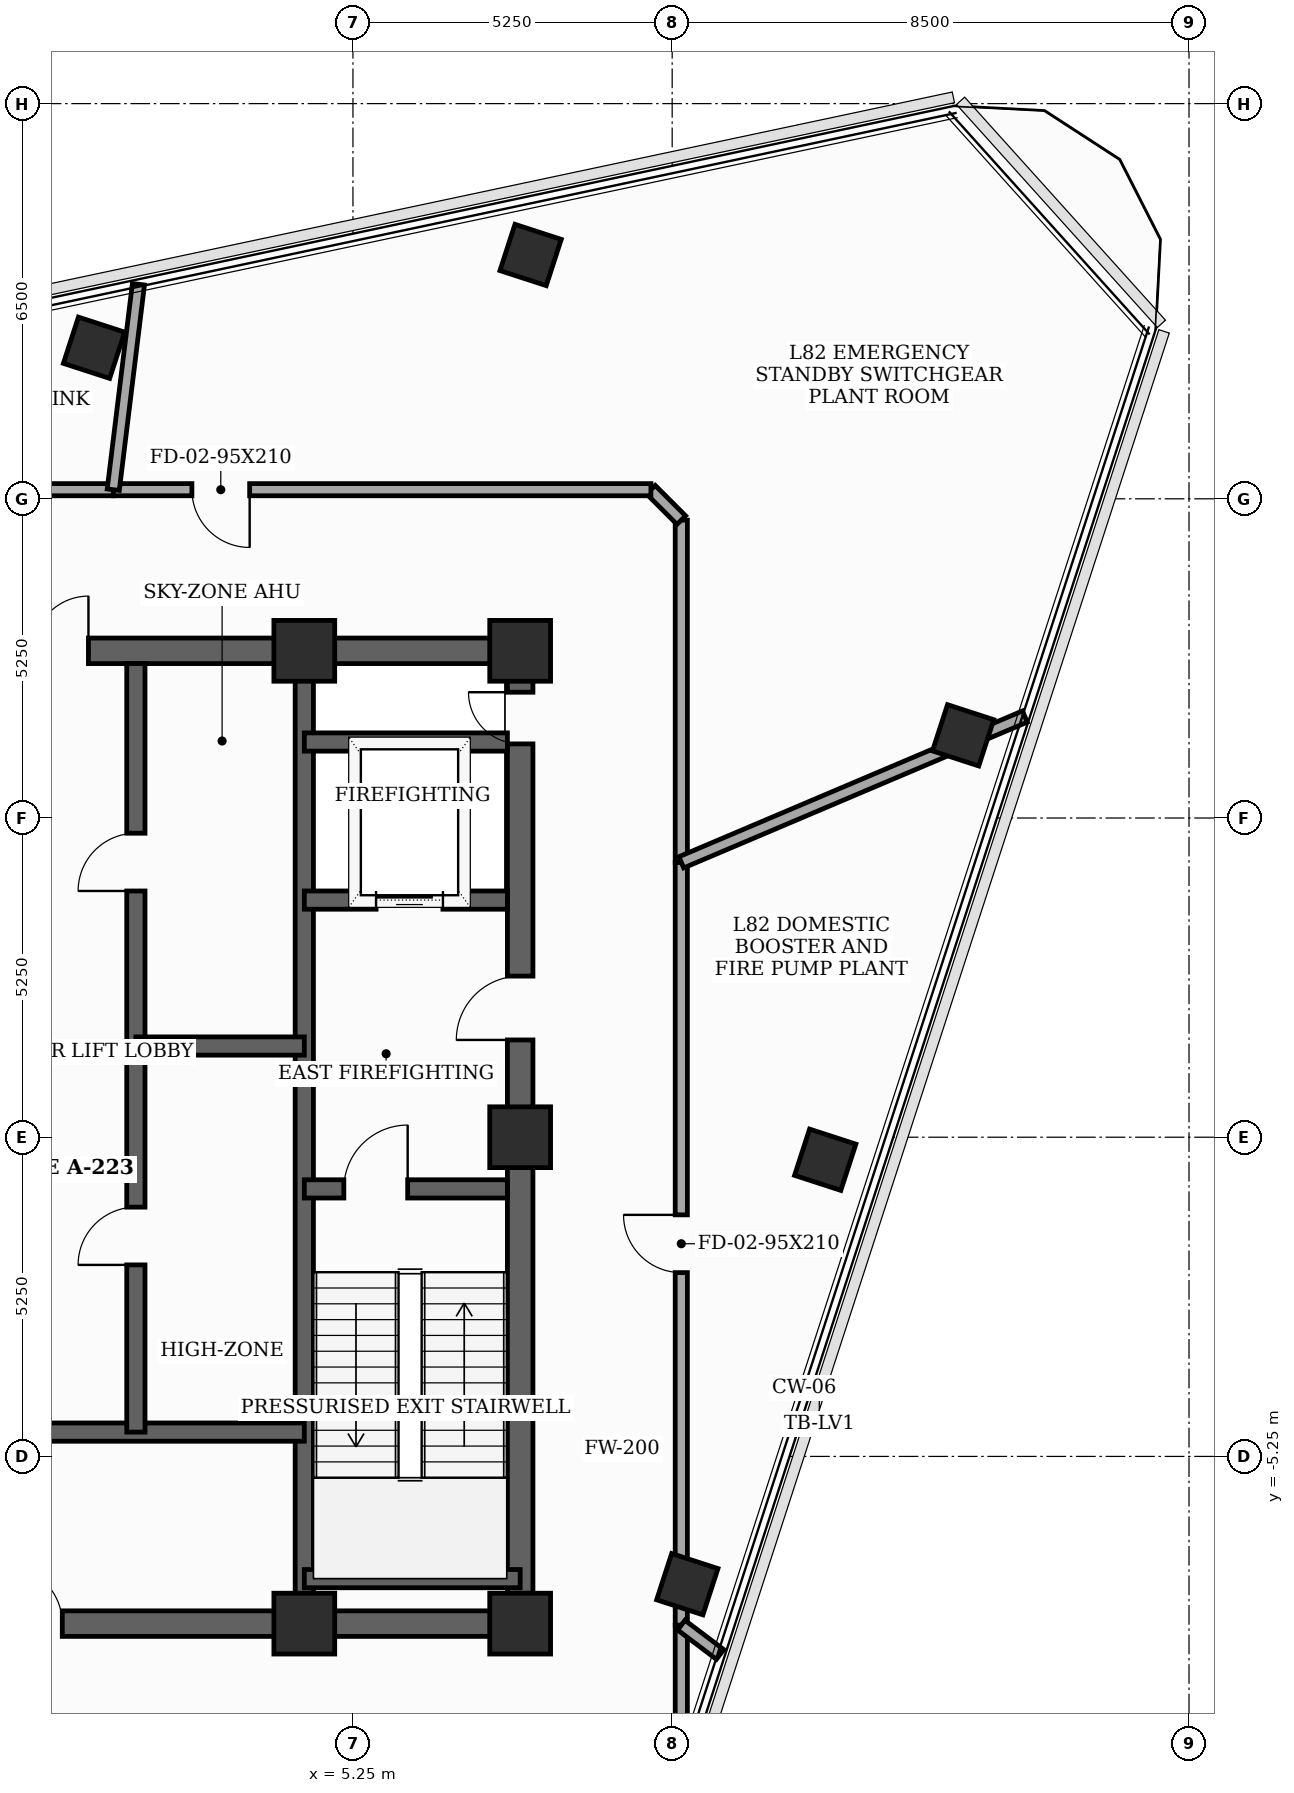
"""IFC4 building model, lengths in metres.
Left out: names, types, materials, properties, quantities, classifications, styles, units other than length and angle.
Written with IfcOpenShell. Run it as: python <this file> out.ifc"""

import sys

from ifc_helpers import new_model, si_unit, direction, frame, frame_2d, origin, origin_2d, place, context, subcontext, project, spatial, rectangle, extrude, element, fill, save


model = new_model("IFC4")
c1 = context("Model", 3, precision=1e-05, world=origin(), true_north=direction((0.0, 1.0)))
c2 = subcontext(c1, "Body", "Model", "MODEL_VIEW")
j1 = project(units=[si_unit("LENGTHUNIT", "METRE"), si_unit("PLANEANGLEUNIT", "RADIAN")], contexts=[c1])
p1 = place(None, origin())
s1 = spatial("IfcSite", under=j1, at=p1, CompositionType="ELEMENT")
p2 = place(p1, origin())
s2 = spatial("IfcBuilding", under=s1, at=p2, CompositionType="ELEMENT")
p3 = place(p2, frame((0.0, 0.0, 317.4)))
s3 = spatial("IfcBuildingStorey", under=s2, at=p3, CompositionType="ELEMENT", Elevation=317.4)
for number, where, z_axis, x_axis in (
    (1, (4.45, -8.0, 0.0), (0.0, 0.0, 1.0), (1.0, 0.0, 0.0)),
    (2, (8.0, -8.0, 0.0), (0.0, 0.0, 1.0), (1.0, 0.0, 0.0)),
    (3, (8.0, 0.0, 0.0), (0.0, 0.0, 1.0), (1.0, 0.0, 0.0)),
    (4, (8.0, 8.0, 0.0), (0.0, 0.0, 1.0), (1.0, 0.0, 0.0)),
    (5, (4.45, 8.0, 0.0), (0.0, 0.0, 1.0), (1.0, 0.0, 0.0)),
):
    element("IfcColumn", number, at=place(p3, frame(where, z_axis=z_axis, x_axis=x_axis)), inside=s3, PredefinedType="COLUMN", context=c2, shape_type="SweptSolid", body=[
        extrude(rectangle(XDim=1.0, YDim=1.0, at=origin_2d()), origin(), (0.0, 0.0, 1.0), 4.6),
    ])
for number, where, z_axis, x_axis in (
    (6, (10.749, -7.351, 0.0), (0.0, 0.0, 1.0), (0.309, 0.951, 0.0)),
    (7, (13.017, -0.371, 0.0), (0.0, 0.0, 1.0), (0.309, 0.951, 0.0)),
    (8, (15.285, 6.61, 0.0), (0.0, 0.0, 1.0), (0.309, 0.951, 0.0)),
    (9, (8.172, 14.51, 0.0), (0.0, 0.0, 1.0), (0.309, 0.951, 0.0)),
    (10, (0.992, 12.984, 0.0), (0.0, 0.0, 1.0), (0.309, 0.951, 0.0)),
):
    element("IfcColumn", number, at=place(p3, frame(where, z_axis=z_axis, x_axis=x_axis)), inside=s3, PredefinedType="COLUMN", context=c2, shape_type="SweptSolid", body=[
        extrude(rectangle(XDim=0.8, YDim=0.8, at=origin_2d()), origin(), (0.0, 0.0, 1.0), 4.6),
    ])
p4 = place(p3, frame((8.0, -8.0, 0.0), z_axis=(0.0, 0.0, 1.0), x_axis=(0.0, 1.0, 0.0)))
e11 = element("IfcWall", 11, at=p4, inside=s3, PredefinedType="SHEAR", context=c2, shape_type="SweptSolid", body=[
    extrude(rectangle(XDim=16.0, YDim=0.42, at=frame_2d((8.0, 0.0))), origin(), (0.0, 0.0, 1.0), 4.38),
])
p5 = place(p4, frame((9.6, 0.0, 0.0)))
e12 = element("IfcOpeningElement", 12, at=p5, cuts=e11, PredefinedType="OPENING", context=c2, shape_type="SweptSolid", body=[
    extrude(rectangle(XDim=1.05, YDim=2.15, at=frame_2d((0.525, 1.075))), frame((0.0, 0.22, 0.0), z_axis=(0.0, -1.0, 0.0), x_axis=(1.0, 0.0, 0.0)), (0.0, 0.0, 1.0), 0.44),
])
p6 = place(p4, frame((14.469, 0.0, 0.0)))
e13 = element("IfcOpeningElement", 13, at=p6, cuts=e11, PredefinedType="OPENING", context=c2, shape_type="SweptSolid", body=[
    extrude(rectangle(XDim=0.85, YDim=2.02, at=frame_2d((0.425, 1.01))), frame((0.0, 0.22, 0.0), z_axis=(0.0, -1.0, 0.0), x_axis=(1.0, 0.0, 0.0)), (0.0, 0.0, 1.0), 0.44),
])
p7 = place(p3, frame((-8.0, -8.0, 0.0), z_axis=(0.0, 0.0, 1.0), x_axis=(1.0, 0.0, 0.0)))
e14 = element("IfcWall", 14, at=p7, inside=s3, PredefinedType="SHEAR", context=c2, shape_type="SweptSolid", body=[
    extrude(rectangle(XDim=16.0, YDim=0.42, at=frame_2d((8.0, 0.0))), origin(), (0.0, 0.0, 1.0), 4.38),
])
p8 = place(p7, frame((7.52, 0.0, 0.0)))
e15 = element("IfcOpeningElement", 15, at=p8, cuts=e14, PredefinedType="OPENING", context=c2, shape_type="SweptSolid", body=[
    extrude(rectangle(XDim=0.95, YDim=2.1, at=frame_2d((0.475, 1.05))), frame((0.0, 0.22, 0.0), z_axis=(0.0, -1.0, 0.0), x_axis=(1.0, 0.0, 0.0)), (0.0, 0.0, 1.0), 0.44),
])
p9 = place(p3, frame((-8.0, 8.0, 0.0), z_axis=(0.0, 0.0, 1.0), x_axis=(1.0, 0.0, 0.0)))
e16 = element("IfcWall", 16, at=p9, inside=s3, PredefinedType="SHEAR", context=c2, shape_type="SweptSolid", body=[
    extrude(rectangle(XDim=16.0, YDim=0.42, at=frame_2d((8.0, 0.0))), origin(), (0.0, 0.0, 1.0), 4.38),
])
p10 = place(p9, frame((7.1, 0.0, 0.0)))
e17 = element("IfcOpeningElement", 17, at=p10, cuts=e16, PredefinedType="OPENING", context=c2, shape_type="SweptSolid", body=[
    extrude(rectangle(XDim=1.8, YDim=2.15, at=frame_2d((0.9, 1.075))), frame((0.0, 0.22, 0.0), z_axis=(0.0, -1.0, 0.0), x_axis=(1.0, 0.0, 0.0)), (0.0, 0.0, 1.0), 0.44),
])
p11 = place(p3, frame((4.45, -7.79, 0.0), z_axis=(0.0, 0.0, 1.0), x_axis=(0.0, 1.0, 0.0)))
e18 = element("IfcWall", 18, at=p11, inside=s3, PredefinedType="SHEAR", context=c2, shape_type="SweptSolid", body=[
    extrude(rectangle(XDim=15.58, YDim=0.3, at=frame_2d((7.79, 0.0))), origin(), (0.0, 0.0, 1.0), 4.38),
])
p12 = place(p3, frame((4.45, -0.85, 0.0), z_axis=(0.0, 0.0, 1.0), x_axis=(1.0, 0.0, 0.0)))
e19 = element("IfcWall", 19, at=p12, inside=s3, PredefinedType="SHEAR", context=c2, shape_type="SweptSolid", body=[
    extrude(rectangle(XDim=3.34, YDim=0.3, at=frame_2d((1.67, 0.0))), origin(), (0.0, 0.0, 1.0), 4.38),
])
p13 = place(p12, frame((0.65, 0.0, 0.0)))
e20 = element("IfcOpeningElement", 20, at=p13, cuts=e19, PredefinedType="OPENING", context=c2, shape_type="SweptSolid", body=[
    extrude(rectangle(XDim=1.05, YDim=2.15, at=frame_2d((0.525, 1.075))), frame((0.0, 0.16, 0.0), z_axis=(0.0, -1.0, 0.0), x_axis=(1.0, 0.0, 0.0)), (0.0, 0.0, 1.0), 0.32),
])
p14 = place(p3, frame((4.45, -7.26, 0.0), z_axis=(0.0, 0.0, 1.0), x_axis=(1.0, 0.0, 0.0)))
e21 = element("IfcWall", 21, at=p14, inside=s3, PredefinedType="SHEAR", context=c2, shape_type="SweptSolid", body=[
    extrude(rectangle(XDim=3.55, YDim=0.3, at=frame_2d((1.775, 0.0))), origin(), (0.0, 0.0, 1.0), 4.38),
])
p15 = place(p3, frame((4.45, 3.9, 0.0), z_axis=(0.0, 0.0, 1.0), x_axis=(1.0, 0.0, 0.0)))
e22 = element("IfcWall", 22, at=p15, inside=s3, PredefinedType="SHEAR", context=c2, shape_type="SweptSolid", body=[
    extrude(rectangle(XDim=3.34, YDim=0.3, at=frame_2d((1.67, 0.0))), origin(), (0.0, 0.0, 1.0), 4.38),
])
p16 = place(p15, frame((1.18, 0.0, 0.0)))
e23 = element("IfcOpeningElement", 23, at=p16, cuts=e22, PredefinedType="OPENING", context=c2, shape_type="SweptSolid", body=[
    extrude(rectangle(XDim=1.1, YDim=2.1, at=frame_2d((0.55, 1.05))), frame((0.0, 0.16, 0.0), z_axis=(0.0, -1.0, 0.0), x_axis=(1.0, 0.0, 0.0)), (0.0, 0.0, 1.0), 0.32),
])
p17 = place(p3, frame((4.45, 6.5, 0.0), z_axis=(0.0, 0.0, 1.0), x_axis=(1.0, 0.0, 0.0)))
e24 = element("IfcWall", 24, at=p17, inside=s3, PredefinedType="SHEAR", context=c2, shape_type="SweptSolid", body=[
    extrude(rectangle(XDim=3.34, YDim=0.3, at=frame_2d((1.67, 0.0))), origin(), (0.0, 0.0, 1.0), 4.38),
])
p18 = place(p3, frame((-4.45, -4.85, 0.0), z_axis=(0.0, 0.0, 1.0), x_axis=(1.0, 0.0, 0.0)))
e25 = element("IfcWall", 25, at=p18, inside=s3, PredefinedType="SHEAR", context=c2, shape_type="SweptSolid", body=[
    extrude(rectangle(XDim=8.9, YDim=0.3, at=frame_2d((4.45, 0.0))), origin(), (0.0, 0.0, 1.0), 4.38),
])
p19 = place(p3, frame((1.68, -4.85, 0.0), z_axis=(0.0, 0.0, 1.0), x_axis=(0.0, 1.0, 0.0)))
e26 = element("IfcWall", 26, at=p19, inside=s3, PredefinedType="SHEAR", context=c2, shape_type="SweptSolid", body=[
    extrude(rectangle(XDim=12.64, YDim=0.3, at=frame_2d((6.32, 0.0))), origin(), (0.0, 0.0, 1.0), 4.38),
])
p20 = place(p19, frame((2.75, 0.0, 0.0)))
e27 = element("IfcOpeningElement", 27, at=p20, cuts=e26, PredefinedType="OPENING", context=c2, shape_type="SweptSolid", body=[
    extrude(rectangle(XDim=0.95, YDim=2.1, at=frame_2d((0.475, 1.05))), frame((0.0, 0.16, 0.0), z_axis=(0.0, -1.0, 0.0), x_axis=(1.0, 0.0, 0.0)), (0.0, 0.0, 1.0), 0.32),
])
p21 = place(p19, frame((8.9, 0.0, 0.0)))
e28 = element("IfcOpeningElement", 28, at=p21, cuts=e26, PredefinedType="OPENING", context=c2, shape_type="SweptSolid", body=[
    extrude(rectangle(XDim=0.95, YDim=2.1, at=frame_2d((0.475, 1.05))), frame((0.0, 0.16, 0.0), z_axis=(0.0, -1.0, 0.0), x_axis=(1.0, 0.0, 0.0)), (0.0, 0.0, 1.0), 0.32),
])
p22 = place(p3, frame((1.68, 1.5, 0.0), z_axis=(0.0, 0.0, 1.0), x_axis=(1.0, 0.0, 0.0)))
e29 = element("IfcWall", 29, at=p22, inside=s3, PredefinedType="SHEAR", context=c2, shape_type="SweptSolid", body=[
    extrude(rectangle(XDim=2.77, YDim=0.3, at=frame_2d((1.385, 0.0))), origin(), (0.0, 0.0, 1.0), 4.38),
])
p23 = place(p3, frame((10.65, -10.15, 0.0), z_axis=(0.0, 0.0, 1.0), x_axis=(0.0, 1.0, 0.0)))
e30 = element("IfcWall", 30, at=p23, inside=s3, PredefinedType="SOLIDWALL", context=c2, shape_type="SweptSolid", body=[
    extrude(rectangle(XDim=2.125, YDim=0.2, at=frame_2d((1.062, 0.0))), origin(), (0.0, 0.0, 1.0), 2.965),
])
p24 = place(p3, frame((10.65, -8.025, 0.0), z_axis=(0.0, 0.0, 1.0), x_axis=(0.0, 1.0, 0.0)))
e31 = element("IfcWall", 31, at=p24, inside=s3, PredefinedType="SOLIDWALL", context=c2, shape_type="SweptSolid", body=[
    extrude(rectangle(XDim=12.546, YDim=0.2, at=frame_2d((6.273, 0.0))), origin(), (0.0, 0.0, 1.0), 2.965),
])
p25 = place(p24, frame((5.798, 0.0, 0.0)))
e32 = element("IfcOpeningElement", 32, at=p25, cuts=e31, PredefinedType="OPENING", context=c2, shape_type="SweptSolid", body=[
    extrude(rectangle(XDim=0.95, YDim=2.1, at=frame_2d((0.475, 1.05))), frame((0.0, 0.11, 0.0), z_axis=(0.0, -1.0, 0.0), x_axis=(1.0, 0.0, 0.0)), (0.0, 0.0, 1.0), 0.22),
])
p26 = place(p3, frame((10.65, 4.521, 0.0), z_axis=(0.0, 0.0, 1.0), x_axis=(0.0, 1.0, 0.0)))
e33 = element("IfcWall", 33, at=p26, inside=s3, PredefinedType="SOLIDWALL", context=c2, shape_type="SweptSolid", body=[
    extrude(rectangle(XDim=5.629, YDim=0.2, at=frame_2d((2.814, 0.0))), origin(), (0.0, 0.0, 1.0), 2.965),
])
p27 = place(p3, frame((10.65, 10.15, 0.0), z_axis=(0.0, 0.0, 1.0), x_axis=(-0.707106781187, 0.707106781187, 0.0)))
e34 = element("IfcWall", 34, at=p27, inside=s3, PredefinedType="SOLIDWALL", context=c2, shape_type="SweptSolid", body=[
    extrude(rectangle(XDim=0.707, YDim=0.2, at=frame_2d((0.354, 0.0))), origin(), (0.0, 0.0, 1.0), 4.38),
])
p28 = place(p3, frame((10.15, 10.65, 0.0), z_axis=(0.0, 0.0, 1.0), x_axis=(-1.0, 0.0, 0.0)))
e35 = element("IfcWall", 35, at=p28, inside=s3, PredefinedType="SOLIDWALL", context=c2, shape_type="SweptSolid", body=[
    extrude(rectangle(XDim=8.842, YDim=0.2, at=frame_2d((4.421, 0.0))), origin(), (0.0, 0.0, 1.0), 2.965),
])
p29 = place(p28, frame((6.599, 0.0, 0.0)))
e36 = element("IfcOpeningElement", 36, at=p29, cuts=e35, PredefinedType="OPENING", context=c2, shape_type="SweptSolid", body=[
    extrude(rectangle(XDim=0.95, YDim=2.1, at=frame_2d((0.475, 1.05))), frame((0.0, 0.11, 0.0), z_axis=(0.0, -1.0, 0.0), x_axis=(1.0, 0.0, 0.0)), (0.0, 0.0, 1.0), 0.22),
])
p30 = place(p3, frame((1.308, 10.65, 0.0), z_axis=(0.0, 0.0, 1.0), x_axis=(-1.0, 0.0, 0.0)))
e37 = element("IfcWall", 37, at=p30, inside=s3, PredefinedType="SOLIDWALL", context=c2, shape_type="SweptSolid", body=[
    extrude(rectangle(XDim=11.458, YDim=0.2, at=frame_2d((5.729, 0.0))), origin(), (0.0, 0.0, 1.0), 2.965),
])
p31 = place(p30, frame((3.879, 0.0, 0.0)))
e38 = element("IfcOpeningElement", 38, at=p31, cuts=e37, PredefinedType="OPENING", context=c2, shape_type="SweptSolid", body=[
    extrude(rectangle(XDim=0.95, YDim=2.1, at=frame_2d((0.475, 1.05))), frame((0.0, 0.11, 0.0), z_axis=(0.0, -1.0, 0.0), x_axis=(1.0, 0.0, 0.0)), (0.0, 0.0, 1.0), 0.22),
])
p32 = place(p3, frame((11.288, -8.507, 0.0), z_axis=(0.0, 0.0, 1.0), x_axis=(-0.798017398901, 0.602634409117, 0.0)))
e39 = element("IfcWall", 39, at=p32, inside=s3, PredefinedType="SOLIDWALL", context=c2, shape_type="SweptSolid", body=[
    extrude(rectangle(XDim=0.8, YDim=0.2, at=frame_2d((0.4, 0.0))), origin(), (0.0, 0.0, 1.0), 2.965),
])
p33 = place(p3, frame((16.3, 6.919, 0.0), z_axis=(0.0, 0.0, 1.0), x_axis=(-0.920534107883, -0.390662202196, 0.0)))
e40 = element("IfcWall", 40, at=p33, inside=s3, PredefinedType="SOLIDWALL", context=c2, shape_type="SweptSolid", body=[
    extrude(rectangle(XDim=6.138, YDim=0.2, at=frame_2d((3.069, 0.0))), origin(), (0.0, 0.0, 1.0), 2.965),
])
p34 = place(p3, frame((1.722, 14.029, 0.0), z_axis=(0.0, 0.0, 1.0), x_axis=(-0.121624820563, -0.992576144698, 0.0)))
e41 = element("IfcWall", 41, at=p34, inside=s3, PredefinedType="SOLIDWALL", context=c2, shape_type="SweptSolid", body=[
    extrude(rectangle(XDim=3.405, YDim=0.2, at=frame_2d((1.702, 0.0))), origin(), (0.0, 0.0, 1.0), 2.965),
])
p35 = place(p5, origin())
e42 = element("IfcDoor", 42, at=p35, inside=s3, OperationType="SINGLE_SWING_LEFT", PredefinedType="DOOR", context=c2, shape_type="SweptSolid", body=[
    extrude(rectangle(XDim=1.05, YDim=2.15, at=frame_2d((0.525, 1.075))), frame((0.0, 0.025, 0.0), z_axis=(0.0, -1.0, 0.0), x_axis=(1.0, 0.0, 0.0)), (0.0, 0.0, 1.0), 0.05),
])
fill(e12, e42)
p36 = place(p6, origin())
e43 = element("IfcDoor", 43, at=p36, inside=s3, OperationType="SINGLE_SWING_RIGHT", PredefinedType="TRAPDOOR", context=c2, shape_type="SweptSolid", body=[
    extrude(rectangle(XDim=0.85, YDim=2.02, at=frame_2d((0.425, 1.01))), frame((0.0, 0.025, 0.0), z_axis=(0.0, -1.0, 0.0), x_axis=(1.0, 0.0, 0.0)), (0.0, 0.0, 1.0), 0.05),
])
fill(e13, e43)
p37 = place(p8, origin())
e44 = element("IfcDoor", 44, at=p37, inside=s3, OperationType="SINGLE_SWING_LEFT", PredefinedType="DOOR", context=c2, shape_type="SweptSolid", body=[
    extrude(rectangle(XDim=0.95, YDim=2.1, at=frame_2d((0.475, 1.05))), frame((0.0, 0.025, 0.0), z_axis=(0.0, -1.0, 0.0), x_axis=(1.0, 0.0, 0.0)), (0.0, 0.0, 1.0), 0.05),
])
fill(e15, e44)
p38 = place(p10, origin())
e45 = element("IfcDoor", 45, at=p38, inside=s3, OperationType="DOUBLE_DOOR_SINGLE_SWING", PredefinedType="DOOR", context=c2, shape_type="SweptSolid", body=[
    extrude(rectangle(XDim=1.8, YDim=2.15, at=frame_2d((0.9, 1.075))), frame((0.0, 0.025, 0.0), z_axis=(0.0, -1.0, 0.0), x_axis=(1.0, 0.0, 0.0)), (0.0, 0.0, 1.0), 0.05),
])
fill(e17, e45)
p39 = place(p13, origin())
e46 = element("IfcDoor", 46, at=p39, inside=s3, OperationType="SINGLE_SWING_RIGHT", PredefinedType="DOOR", context=c2, shape_type="SweptSolid", body=[
    extrude(rectangle(XDim=1.05, YDim=2.15, at=frame_2d((0.525, 1.075))), frame((0.0, 0.025, 0.0), z_axis=(0.0, -1.0, 0.0), x_axis=(1.0, 0.0, 0.0)), (0.0, 0.0, 1.0), 0.05),
])
fill(e20, e46)
p40 = place(p16, origin())
e47 = element("IfcDoor", 47, at=p40, inside=s3, OperationType="SLIDING_TO_LEFT", PredefinedType="DOOR", context=c2, shape_type="SweptSolid", body=[
    extrude(rectangle(XDim=1.1, YDim=2.1, at=frame_2d((0.55, 1.05))), frame((0.0, 0.025, 0.0), z_axis=(0.0, -1.0, 0.0), x_axis=(1.0, 0.0, 0.0)), (0.0, 0.0, 1.0), 0.05),
])
fill(e23, e47)
p41 = place(p20, origin())
e48 = element("IfcDoor", 48, at=p41, inside=s3, OperationType="SINGLE_SWING_LEFT", PredefinedType="DOOR", context=c2, shape_type="SweptSolid", body=[
    extrude(rectangle(XDim=0.95, YDim=2.1, at=frame_2d((0.475, 1.05))), frame((0.0, 0.025, 0.0), z_axis=(0.0, -1.0, 0.0), x_axis=(1.0, 0.0, 0.0)), (0.0, 0.0, 1.0), 0.05),
])
fill(e27, e48)
p42 = place(p21, origin())
e49 = element("IfcDoor", 49, at=p42, inside=s3, OperationType="SINGLE_SWING_LEFT", PredefinedType="DOOR", context=c2, shape_type="SweptSolid", body=[
    extrude(rectangle(XDim=0.95, YDim=2.1, at=frame_2d((0.475, 1.05))), frame((0.0, 0.025, 0.0), z_axis=(0.0, -1.0, 0.0), x_axis=(1.0, 0.0, 0.0)), (0.0, 0.0, 1.0), 0.05),
])
fill(e28, e49)
p43 = place(p25, origin())
e50 = element("IfcDoor", 50, at=p43, inside=s3, OperationType="SINGLE_SWING_RIGHT", PredefinedType="DOOR", context=c2, shape_type="SweptSolid", body=[
    extrude(rectangle(XDim=0.95, YDim=2.1, at=frame_2d((0.475, 1.05))), frame((0.0, 0.025, 0.0), z_axis=(0.0, -1.0, 0.0), x_axis=(1.0, 0.0, 0.0)), (0.0, 0.0, 1.0), 0.05),
])
fill(e32, e50)
p44 = place(p29, origin())
e51 = element("IfcDoor", 51, at=p44, inside=s3, OperationType="SINGLE_SWING_LEFT", PredefinedType="DOOR", context=c2, shape_type="SweptSolid", body=[
    extrude(rectangle(XDim=0.95, YDim=2.1, at=frame_2d((0.475, 1.05))), frame((0.0, 0.025, 0.0), z_axis=(0.0, -1.0, 0.0), x_axis=(1.0, 0.0, 0.0)), (0.0, 0.0, 1.0), 0.05),
])
fill(e36, e51)
save(model, sys.argv[1])
